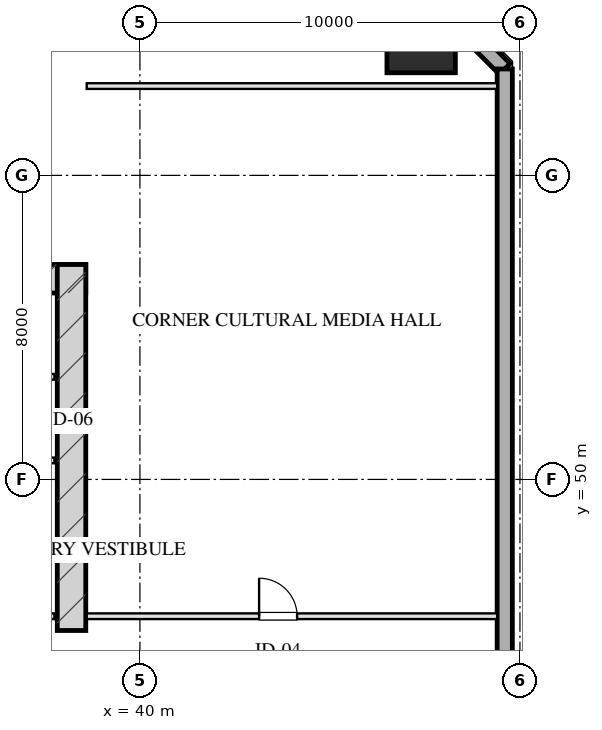
"""IFC4 building model, lengths in metres.
Left out: names, types, materials, properties, quantities, classifications, styles, units other than length and angle.
Written with IfcOpenShell. Run it as: python <this file> out.ifc"""

import sys

from ifc_helpers import new_model, si_unit, direction, frame, frame_2d, origin, origin_2d, place, context, subcontext, project, spatial, rectangle, hollow_rectangle, extrude, element, fill, save


model = new_model("IFC4")
c1 = context("Model", 3, precision=1e-05, world=origin(), true_north=direction((0.0, 1.0)))
c2 = subcontext(c1, "Body", "Model", "MODEL_VIEW")
j1 = project(units=[si_unit("LENGTHUNIT", "METRE"), si_unit("PLANEANGLEUNIT", "RADIAN")], contexts=[c1])
p1 = place(None, origin())
s1 = spatial("IfcSite", under=j1, at=p1, CompositionType="ELEMENT")
p2 = place(p1, origin())
s2 = spatial("IfcBuilding", under=s1, at=p2, CompositionType="ELEMENT")
p3 = place(p2, frame((0.0, 0.0, 74.75)))
s3 = spatial("IfcBuildingStorey", under=s2, at=p3, CompositionType="ELEMENT", Elevation=74.75)
p4 = place(p3, frame((21.425, 55.28, 0.0), z_axis=(0.0, 0.0, 1.0), x_axis=(1.0, 0.0, 0.0)))
e1 = element("IfcWall", 1, at=p4, inside=s3, PredefinedType="SHEAR", context=c2, shape_type="SweptSolid", body=[
    extrude(rectangle(XDim=17.15, YDim=0.75, at=frame_2d((8.575, 0.0))), origin(), (0.0, 0.0, 1.0), 3.45),
])
p5 = place(p3, frame((38.2, 46.025, 0.0), z_axis=(0.0, 0.0, 1.0), x_axis=(0.0, 1.0, 0.0)))
e2 = element("IfcWall", 2, at=p5, inside=s3, PredefinedType="SHEAR", context=c2, shape_type="SweptSolid", body=[
    extrude(rectangle(XDim=9.63, YDim=0.75, at=frame_2d((4.815, 0.0))), origin(), (0.0, 0.0, 1.0), 3.45),
])
p6 = place(p3, frame((47.4, 61.6, 0.0), z_axis=(0.0, 0.0, 1.0), x_axis=(1.0, 0.0, 0.0)))
e3 = element("IfcColumn", 3, at=p6, inside=s3, PredefinedType="COLUMN", context=c2, shape_type="SweptSolid", body=[
    extrude(hollow_rectangle(XDim=1.8, YDim=1.8, WallThickness=0.06, at=origin_2d()), origin(), (0.0, 0.0, 1.0), 3.451),
])
p7 = place(p3, frame((46.6, 63.8, 0.0), z_axis=(0.0, 0.0, 1.0), x_axis=(0.707106781187, -0.707106781187, 0.0)))
e4 = element("IfcWall", 4, at=p7, inside=s3, PredefinedType="SOLIDWALL", context=c2, shape_type="SweptSolid", body=[
    extrude(rectangle(XDim=4.243, YDim=0.4, at=frame_2d((2.121, 0.0))), origin(), (0.0, 0.0, 1.0), 2.61),
])
p8 = place(p3, frame((49.6, 60.8, 0.0), z_axis=(0.0, 0.0, 1.0), x_axis=(0.0, -1.0, 0.0)))
e5 = element("IfcWall", 5, at=p8, inside=s3, PredefinedType="SOLIDWALL", context=c2, shape_type="SweptSolid", body=[
    extrude(rectangle(XDim=53.6, YDim=0.4, at=frame_2d((26.8, 0.0))), origin(), (0.0, 0.0, 1.0), 2.61),
])
p9 = place(p3, frame((33.95, 46.4, 0.0), z_axis=(0.0, 0.0, 1.0), x_axis=(1.0, 0.0, 0.0)))
e6 = element("IfcWall", 6, at=p9, inside=s3, PredefinedType="PARTITIONING", context=c2, shape_type="SweptSolid", body=[
    extrude(rectangle(XDim=3.8, YDim=0.15, at=frame_2d((1.9, 0.0))), origin(), (0.0, 0.0, 1.0), 3.175),
])
p10 = place(p9, frame((0.22, 0.0, 0.0)))
e7 = element("IfcOpeningElement", 7, at=p10, cuts=e6, PredefinedType="OPENING", context=c2, shape_type="SweptSolid", body=[
    extrude(rectangle(XDim=0.95, YDim=2.05, at=frame_2d((0.475, 1.025))), frame((0.0, 0.085, 0.0), z_axis=(0.0, -1.0, 0.0), x_axis=(1.0, 0.0, 0.0)), (0.0, 0.0, 1.0), 0.17),
])
for number, where, z_axis, x_axis in (
    (8, (35.45, 50.5, 0.0), (0.0, 0.0, 1.0), (1.0, 0.0, 0.0)),
    (9, (35.45, 52.7, 0.0), (0.0, 0.0, 1.0), (1.0, 0.0, 0.0)),
):
    element("IfcWall", number, at=place(p3, frame(where, z_axis=z_axis, x_axis=x_axis)), inside=s3, PredefinedType="PARTITIONING", context=c2, shape_type="SweptSolid", body=[
        extrude(rectangle(XDim=2.3, YDim=0.15, at=frame_2d((1.15, 0.0))), origin(), (0.0, 0.0, 1.0), 3.175),
    ])
p11 = place(p3, frame((38.6, 60.35, 0.0), z_axis=(0.0, 0.0, 1.0), x_axis=(1.0, 0.0, 0.0)))
e10 = element("IfcWall", 10, at=p11, inside=s3, PredefinedType="PARTITIONING", context=c2, shape_type="SweptSolid", body=[
    extrude(rectangle(XDim=10.8, YDim=0.15, at=frame_2d((5.4, 0.0))), origin(), (0.0, 0.0, 1.0), 3.175),
])
p12 = place(p3, frame((38.6, 46.4, 0.0), z_axis=(0.0, 0.0, 1.0), x_axis=(1.0, 0.0, 0.0)))
e11 = element("IfcWall", 11, at=p12, inside=s3, PredefinedType="PARTITIONING", context=c2, shape_type="SweptSolid", body=[
    extrude(rectangle(XDim=10.8, YDim=0.15, at=frame_2d((5.4, 0.0))), origin(), (0.0, 0.0, 1.0), 3.175),
])
p13 = place(p12, frame((4.536, 0.0, 0.0)))
e12 = element("IfcOpeningElement", 12, at=p13, cuts=e11, PredefinedType="OPENING", context=c2, shape_type="SweptSolid", body=[
    extrude(rectangle(XDim=1.0, YDim=2.05, at=frame_2d((0.5, 1.025))), frame((0.0, 0.085, 0.0), z_axis=(0.0, -1.0, 0.0), x_axis=(1.0, 0.0, 0.0)), (0.0, 0.0, 1.0), 0.17),
])
p14 = place(p13, origin())
e13 = element("IfcDoor", 13, at=p14, inside=s3, OperationType="SINGLE_SWING_LEFT", PredefinedType="DOOR", context=c2, shape_type="SweptSolid", body=[
    extrude(rectangle(XDim=1.0, YDim=2.05, at=frame_2d((0.5, 1.025))), frame((0.0, 0.025, 0.0), z_axis=(0.0, -1.0, 0.0), x_axis=(1.0, 0.0, 0.0)), (0.0, 0.0, 1.0), 0.05),
])
fill(e12, e13)
save(model, sys.argv[1])
